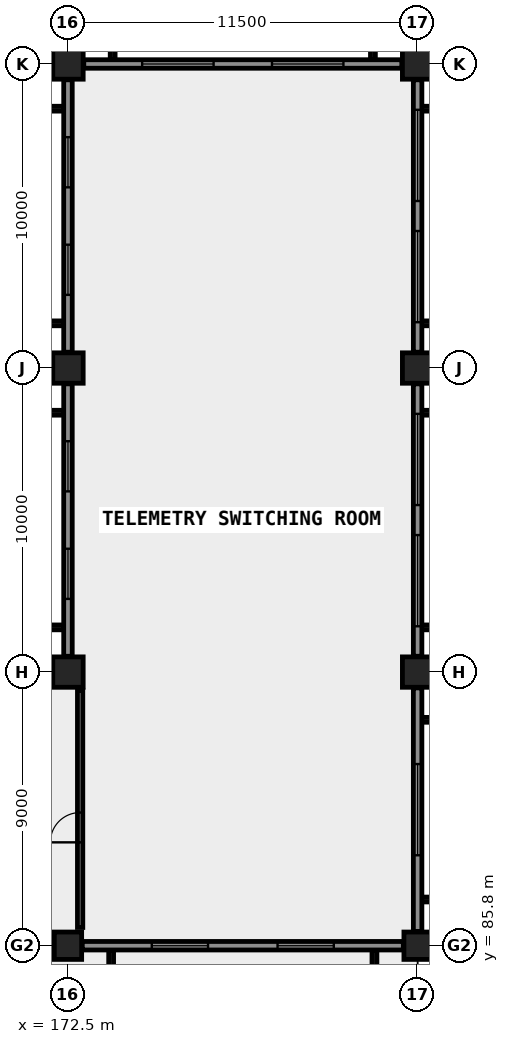
"""IFC4 building model, lengths in metres.
Left out: names, types, materials, properties, quantities, classifications, styles, units other than length and angle.
Written with IfcOpenShell. Run it as: python <this file> out.ifc"""

import sys

from ifc_helpers import new_model, si_unit, direction, frame, frame_2d, origin, origin_2d, place, context, subcontext, project, spatial, rectangle, extrude, element, fill, save


model = new_model("IFC4")
c1 = context("Model", 3, precision=1e-05, world=origin(), true_north=direction((0.0, 1.0)))
c2 = subcontext(c1, "Body", "Model", "MODEL_VIEW")
j1 = project(units=[si_unit("LENGTHUNIT", "METRE"), si_unit("PLANEANGLEUNIT", "RADIAN")], contexts=[c1])
p1 = place(None, origin())
s1 = spatial("IfcSite", under=j1, at=p1, CompositionType="ELEMENT")
p2 = place(p1, origin())
s2 = spatial("IfcBuilding", under=s1, at=p2, CompositionType="ELEMENT")
p3 = place(p2, frame((0.0, 0.0, 8.4)))
s3 = spatial("IfcBuildingStorey", under=s2, at=p3, CompositionType="ELEMENT", Elevation=8.4)
p4 = place(p3, frame((172.5, 85.8, 0.0), z_axis=(0.0, 0.0, 1.0), x_axis=(1.0, 0.0, 0.0)))
e1 = element("IfcColumn", 1, at=p4, inside=s3, PredefinedType="COLUMN", context=c2, shape_type="SweptSolid", body=[
    extrude(rectangle(XDim=0.9, YDim=0.9, at=origin_2d()), origin(), (0.0, 0.0, 1.0), 5.4),
])
for number, where, z_axis, x_axis in (
    (2, (172.5, 94.8, 0.0), (0.0, 0.0, 1.0), (1.0, 0.0, 0.0)),
    (3, (172.5, 104.8, 0.0), (0.0, 0.0, 1.0), (1.0, 0.0, 0.0)),
    (4, (172.5, 114.8, 0.0), (0.0, 0.0, 1.0), (1.0, 0.0, 0.0)),
):
    element("IfcColumn", number, at=place(p3, frame(where, z_axis=z_axis, x_axis=x_axis)), inside=s3, PredefinedType="COLUMN", context=c2, shape_type="SweptSolid", body=[
        extrude(rectangle(XDim=1.0, YDim=1.0, at=origin_2d()), origin(), (0.0, 0.0, 1.0), 5.4),
    ])
p5 = place(p3, frame((184.0, 85.8, 0.0), z_axis=(0.0, 0.0, 1.0), x_axis=(1.0, 0.0, 0.0)))
e5 = element("IfcColumn", 5, at=p5, inside=s3, PredefinedType="COLUMN", context=c2, shape_type="SweptSolid", body=[
    extrude(rectangle(XDim=0.9, YDim=0.9, at=origin_2d()), origin(), (0.0, 0.0, 1.0), 5.4),
])
for number, where, z_axis, x_axis in (
    (6, (184.0, 94.8, 0.0), (0.0, 0.0, 1.0), (1.0, 0.0, 0.0)),
    (7, (184.0, 104.8, 0.0), (0.0, 0.0, 1.0), (1.0, 0.0, 0.0)),
    (8, (184.0, 114.8, 0.0), (0.0, 0.0, 1.0), (1.0, 0.0, 0.0)),
):
    element("IfcColumn", number, at=place(p3, frame(where, z_axis=z_axis, x_axis=x_axis)), inside=s3, PredefinedType="COLUMN", context=c2, shape_type="SweptSolid", body=[
        extrude(rectangle(XDim=1.0, YDim=1.0, at=origin_2d()), origin(), (0.0, 0.0, 1.0), 5.4),
    ])
p6 = place(p3, frame((161.47, 85.8, 0.0), z_axis=(0.0, 0.0, 1.0), x_axis=(1.0, 0.0, 0.0)))
e9 = element("IfcWall", 9, at=p6, inside=s3, PredefinedType="SOLIDWALL", context=c2, shape_type="SweptSolid", body=[
    extrude(rectangle(XDim=10.56, YDim=0.28, at=frame_2d((5.28, 0.0))), origin(), (0.0, 0.0, 1.0), 4.35),
])
p7 = place(p6, frame((2.287, 0.0, 0.85)))
e10 = element("IfcOpeningElement", 10, at=p7, cuts=e9, PredefinedType="OPENING", context=c2, shape_type="SweptSolid", body=[
    extrude(rectangle(XDim=1.85, YDim=1.85, at=frame_2d((0.925, 0.925))), frame((0.0, 0.15, 0.0), z_axis=(0.0, -1.0, 0.0), x_axis=(1.0, 0.0, 0.0)), (0.0, 0.0, 1.0), 0.3),
])
p8 = place(p6, frame((6.423, 0.0, 0.85)))
e11 = element("IfcOpeningElement", 11, at=p8, cuts=e9, PredefinedType="OPENING", context=c2, shape_type="SweptSolid", body=[
    extrude(rectangle(XDim=1.85, YDim=1.85, at=frame_2d((0.925, 0.925))), frame((0.0, 0.15, 0.0), z_axis=(0.0, -1.0, 0.0), x_axis=(1.0, 0.0, 0.0)), (0.0, 0.0, 1.0), 0.3),
])
p9 = place(p3, frame((172.97, 85.8, 0.0), z_axis=(0.0, 0.0, 1.0), x_axis=(1.0, 0.0, 0.0)))
e12 = element("IfcWall", 12, at=p9, inside=s3, PredefinedType="SOLIDWALL", context=c2, shape_type="SweptSolid", body=[
    extrude(rectangle(XDim=10.56, YDim=0.28, at=frame_2d((5.28, 0.0))), origin(), (0.0, 0.0, 1.0), 4.35),
])
p10 = place(p9, frame((2.287, 0.0, 0.85)))
e13 = element("IfcOpeningElement", 13, at=p10, cuts=e12, PredefinedType="OPENING", context=c2, shape_type="SweptSolid", body=[
    extrude(rectangle(XDim=1.85, YDim=1.85, at=frame_2d((0.925, 0.925))), frame((0.0, 0.15, 0.0), z_axis=(0.0, -1.0, 0.0), x_axis=(1.0, 0.0, 0.0)), (0.0, 0.0, 1.0), 0.3),
])
p11 = place(p9, frame((6.423, 0.0, 0.85)))
e14 = element("IfcOpeningElement", 14, at=p11, cuts=e12, PredefinedType="OPENING", context=c2, shape_type="SweptSolid", body=[
    extrude(rectangle(XDim=1.85, YDim=1.85, at=frame_2d((0.925, 0.925))), frame((0.0, 0.15, 0.0), z_axis=(0.0, -1.0, 0.0), x_axis=(1.0, 0.0, 0.0)), (0.0, 0.0, 1.0), 0.3),
])
p12 = place(p3, frame((184.0, 86.27, 0.0), z_axis=(0.0, 0.0, 1.0), x_axis=(0.0, 1.0, 0.0)))
e15 = element("IfcWall", 15, at=p12, inside=s3, PredefinedType="SOLIDWALL", context=c2, shape_type="SweptSolid", body=[
    extrude(rectangle(XDim=8.01, YDim=0.28, at=frame_2d((4.005, 0.0))), origin(), (0.0, 0.0, 1.0), 4.45),
])
p13 = place(p12, frame((2.505, 0.0, 0.85)))
e16 = element("IfcOpeningElement", 16, at=p13, cuts=e15, PredefinedType="OPENING", context=c2, shape_type="SweptSolid", body=[
    extrude(rectangle(XDim=3.0, YDim=2.0, at=frame_2d((1.5, 1.0))), frame((0.0, 0.15, 0.0), z_axis=(0.0, -1.0, 0.0), x_axis=(1.0, 0.0, 0.0)), (0.0, 0.0, 1.0), 0.3),
])
p14 = place(p3, frame((184.0, 95.32, 0.0), z_axis=(0.0, 0.0, 1.0), x_axis=(0.0, 1.0, 0.0)))
e17 = element("IfcWall", 17, at=p14, inside=s3, PredefinedType="SOLIDWALL", context=c2, shape_type="SweptSolid", body=[
    extrude(rectangle(XDim=8.96, YDim=0.28, at=frame_2d((4.48, 0.0))), origin(), (0.0, 0.0, 1.0), 4.45),
])
p15 = place(p14, frame((0.987, 0.0, 0.85)))
e18 = element("IfcOpeningElement", 18, at=p15, cuts=e17, PredefinedType="OPENING", context=c2, shape_type="SweptSolid", body=[
    extrude(rectangle(XDim=3.0, YDim=2.0, at=frame_2d((1.5, 1.0))), frame((0.0, 0.15, 0.0), z_axis=(0.0, -1.0, 0.0), x_axis=(1.0, 0.0, 0.0)), (0.0, 0.0, 1.0), 0.3),
])
p16 = place(p14, frame((4.973, 0.0, 0.85)))
e19 = element("IfcOpeningElement", 19, at=p16, cuts=e17, PredefinedType="OPENING", context=c2, shape_type="SweptSolid", body=[
    extrude(rectangle(XDim=3.0, YDim=2.0, at=frame_2d((1.5, 1.0))), frame((0.0, 0.15, 0.0), z_axis=(0.0, -1.0, 0.0), x_axis=(1.0, 0.0, 0.0)), (0.0, 0.0, 1.0), 0.3),
])
p17 = place(p3, frame((184.0, 105.32, 0.0), z_axis=(0.0, 0.0, 1.0), x_axis=(0.0, 1.0, 0.0)))
e20 = element("IfcWall", 20, at=p17, inside=s3, PredefinedType="SOLIDWALL", context=c2, shape_type="SweptSolid", body=[
    extrude(rectangle(XDim=8.96, YDim=0.28, at=frame_2d((4.48, 0.0))), origin(), (0.0, 0.0, 1.0), 4.45),
])
p18 = place(p17, frame((0.987, 0.0, 0.85)))
e21 = element("IfcOpeningElement", 21, at=p18, cuts=e20, PredefinedType="OPENING", context=c2, shape_type="SweptSolid", body=[
    extrude(rectangle(XDim=3.0, YDim=2.0, at=frame_2d((1.5, 1.0))), frame((0.0, 0.15, 0.0), z_axis=(0.0, -1.0, 0.0), x_axis=(1.0, 0.0, 0.0)), (0.0, 0.0, 1.0), 0.3),
])
p19 = place(p17, frame((4.973, 0.0, 0.85)))
e22 = element("IfcOpeningElement", 22, at=p19, cuts=e20, PredefinedType="OPENING", context=c2, shape_type="SweptSolid", body=[
    extrude(rectangle(XDim=3.0, YDim=2.0, at=frame_2d((1.5, 1.0))), frame((0.0, 0.15, 0.0), z_axis=(0.0, -1.0, 0.0), x_axis=(1.0, 0.0, 0.0)), (0.0, 0.0, 1.0), 0.3),
])
p20 = place(p3, frame((173.02, 114.8, 0.0), z_axis=(0.0, 0.0, 1.0), x_axis=(1.0, 0.0, 0.0)))
e23 = element("IfcWall", 23, at=p20, inside=s3, PredefinedType="SOLIDWALL", context=c2, shape_type="SweptSolid", body=[
    extrude(rectangle(XDim=10.46, YDim=0.28, at=frame_2d((5.23, 0.0))), origin(), (0.0, 0.0, 1.0), 4.35),
])
p21 = place(p20, frame((1.92, 0.0, 0.85)))
e24 = element("IfcOpeningElement", 24, at=p21, cuts=e23, PredefinedType="OPENING", context=c2, shape_type="SweptSolid", body=[
    extrude(rectangle(XDim=2.35, YDim=2.05, at=frame_2d((1.175, 1.025))), frame((0.0, 0.15, 0.0), z_axis=(0.0, -1.0, 0.0), x_axis=(1.0, 0.0, 0.0)), (0.0, 0.0, 1.0), 0.3),
])
p22 = place(p20, frame((6.19, 0.0, 0.85)))
e25 = element("IfcOpeningElement", 25, at=p22, cuts=e23, PredefinedType="OPENING", context=c2, shape_type="SweptSolid", body=[
    extrude(rectangle(XDim=2.35, YDim=2.05, at=frame_2d((1.175, 1.025))), frame((0.0, 0.15, 0.0), z_axis=(0.0, -1.0, 0.0), x_axis=(1.0, 0.0, 0.0)), (0.0, 0.0, 1.0), 0.3),
])
p23 = place(p3, frame((172.5, 95.32, 0.0), z_axis=(0.0, 0.0, 1.0), x_axis=(0.0, 1.0, 0.0)))
e26 = element("IfcWall", 26, at=p23, inside=s3, PredefinedType="SOLIDWALL", context=c2, shape_type="SweptSolid", body=[
    extrude(rectangle(XDim=8.96, YDim=0.28, at=frame_2d((4.48, 0.0))), origin(), (0.0, 0.0, 1.0), 4.35),
])
p24 = place(p23, frame((1.887, 0.0, 0.85)))
e27 = element("IfcOpeningElement", 27, at=p24, cuts=e26, PredefinedType="OPENING", context=c2, shape_type="SweptSolid", body=[
    extrude(rectangle(XDim=1.65, YDim=1.9, at=frame_2d((0.825, 0.95))), frame((0.0, 0.15, 0.0), z_axis=(0.0, -1.0, 0.0), x_axis=(1.0, 0.0, 0.0)), (0.0, 0.0, 1.0), 0.3),
])
p25 = place(p23, frame((5.423, 0.0, 0.85)))
e28 = element("IfcOpeningElement", 28, at=p25, cuts=e26, PredefinedType="OPENING", context=c2, shape_type="SweptSolid", body=[
    extrude(rectangle(XDim=1.65, YDim=1.9, at=frame_2d((0.825, 0.95))), frame((0.0, 0.15, 0.0), z_axis=(0.0, -1.0, 0.0), x_axis=(1.0, 0.0, 0.0)), (0.0, 0.0, 1.0), 0.3),
])
p26 = place(p3, frame((172.5, 105.32, 0.0), z_axis=(0.0, 0.0, 1.0), x_axis=(0.0, 1.0, 0.0)))
e29 = element("IfcWall", 29, at=p26, inside=s3, PredefinedType="SOLIDWALL", context=c2, shape_type="SweptSolid", body=[
    extrude(rectangle(XDim=8.96, YDim=0.28, at=frame_2d((4.48, 0.0))), origin(), (0.0, 0.0, 1.0), 4.35),
])
p27 = place(p26, frame((1.887, 0.0, 0.85)))
e30 = element("IfcOpeningElement", 30, at=p27, cuts=e29, PredefinedType="OPENING", context=c2, shape_type="SweptSolid", body=[
    extrude(rectangle(XDim=1.65, YDim=1.9, at=frame_2d((0.825, 0.95))), frame((0.0, 0.15, 0.0), z_axis=(0.0, -1.0, 0.0), x_axis=(1.0, 0.0, 0.0)), (0.0, 0.0, 1.0), 0.3),
])
p28 = place(p26, frame((5.423, 0.0, 0.85)))
e31 = element("IfcOpeningElement", 31, at=p28, cuts=e29, PredefinedType="OPENING", context=c2, shape_type="SweptSolid", body=[
    extrude(rectangle(XDim=1.65, YDim=1.9, at=frame_2d((0.825, 0.95))), frame((0.0, 0.15, 0.0), z_axis=(0.0, -1.0, 0.0), x_axis=(1.0, 0.0, 0.0)), (0.0, 0.0, 1.0), 0.3),
])
p29 = place(p3, frame((172.9, 86.4, 0.0), z_axis=(0.0, 0.0, 1.0), x_axis=(0.0, 1.0, 0.0)))
e32 = element("IfcWall", 32, at=p29, inside=s3, PredefinedType="PARTITIONING", context=c2, shape_type="SweptSolid", body=[
    extrude(rectangle(XDim=7.8, YDim=0.175, at=frame_2d((3.9, 0.0))), origin(), (0.0, 0.0, 1.0), 5.12),
])
p30 = place(p29, frame((2.8, 0.0, 0.0)))
e33 = element("IfcOpeningElement", 33, at=p30, cuts=e32, PredefinedType="OPENING", context=c2, shape_type="SweptSolid", body=[
    extrude(rectangle(XDim=0.98, YDim=2.15, at=frame_2d((0.49, 1.075))), frame((0.0, 0.098, 0.0), z_axis=(0.0, -1.0, 0.0), x_axis=(1.0, 0.0, 0.0)), (0.0, 0.0, 1.0), 0.195),
])
p31 = place(p10, origin())
e34 = element("IfcWindow", 34, at=p31, inside=s3, PartitioningType="SINGLE_PANEL", PredefinedType="WINDOW", context=c2, shape_type="SweptSolid", body=[
    extrude(rectangle(XDim=1.85, YDim=1.85, at=frame_2d((0.925, 0.925))), frame((0.0, 0.03, 0.0), z_axis=(0.0, -1.0, 0.0), x_axis=(1.0, 0.0, 0.0)), (0.0, 0.0, 1.0), 0.06),
])
fill(e13, e34)
p32 = place(p11, origin())
e35 = element("IfcWindow", 35, at=p32, inside=s3, PartitioningType="SINGLE_PANEL", PredefinedType="WINDOW", context=c2, shape_type="SweptSolid", body=[
    extrude(rectangle(XDim=1.85, YDim=1.85, at=frame_2d((0.925, 0.925))), frame((0.0, 0.03, 0.0), z_axis=(0.0, -1.0, 0.0), x_axis=(1.0, 0.0, 0.0)), (0.0, 0.0, 1.0), 0.06),
])
fill(e14, e35)
p33 = place(p13, origin())
e36 = element("IfcWindow", 36, at=p33, inside=s3, PartitioningType="SINGLE_PANEL", PredefinedType="WINDOW", context=c2, shape_type="SweptSolid", body=[
    extrude(rectangle(XDim=3.0, YDim=2.0, at=frame_2d((1.5, 1.0))), frame((0.0, 0.03, 0.0), z_axis=(0.0, -1.0, 0.0), x_axis=(1.0, 0.0, 0.0)), (0.0, 0.0, 1.0), 0.06),
])
fill(e16, e36)
p34 = place(p15, origin())
e37 = element("IfcWindow", 37, at=p34, inside=s3, PartitioningType="SINGLE_PANEL", PredefinedType="WINDOW", context=c2, shape_type="SweptSolid", body=[
    extrude(rectangle(XDim=3.0, YDim=2.0, at=frame_2d((1.5, 1.0))), frame((0.0, 0.03, 0.0), z_axis=(0.0, -1.0, 0.0), x_axis=(1.0, 0.0, 0.0)), (0.0, 0.0, 1.0), 0.06),
])
fill(e18, e37)
p35 = place(p16, origin())
e38 = element("IfcWindow", 38, at=p35, inside=s3, PartitioningType="SINGLE_PANEL", PredefinedType="WINDOW", context=c2, shape_type="SweptSolid", body=[
    extrude(rectangle(XDim=3.0, YDim=2.0, at=frame_2d((1.5, 1.0))), frame((0.0, 0.03, 0.0), z_axis=(0.0, -1.0, 0.0), x_axis=(1.0, 0.0, 0.0)), (0.0, 0.0, 1.0), 0.06),
])
fill(e19, e38)
p36 = place(p18, origin())
e39 = element("IfcWindow", 39, at=p36, inside=s3, PartitioningType="SINGLE_PANEL", PredefinedType="WINDOW", context=c2, shape_type="SweptSolid", body=[
    extrude(rectangle(XDim=3.0, YDim=2.0, at=frame_2d((1.5, 1.0))), frame((0.0, 0.03, 0.0), z_axis=(0.0, -1.0, 0.0), x_axis=(1.0, 0.0, 0.0)), (0.0, 0.0, 1.0), 0.06),
])
fill(e21, e39)
p37 = place(p19, origin())
e40 = element("IfcWindow", 40, at=p37, inside=s3, PartitioningType="SINGLE_PANEL", PredefinedType="WINDOW", context=c2, shape_type="SweptSolid", body=[
    extrude(rectangle(XDim=3.0, YDim=2.0, at=frame_2d((1.5, 1.0))), frame((0.0, 0.03, 0.0), z_axis=(0.0, -1.0, 0.0), x_axis=(1.0, 0.0, 0.0)), (0.0, 0.0, 1.0), 0.06),
])
fill(e22, e40)
p38 = place(p21, origin())
e41 = element("IfcWindow", 41, at=p38, inside=s3, PartitioningType="SINGLE_PANEL", PredefinedType="WINDOW", context=c2, shape_type="SweptSolid", body=[
    extrude(rectangle(XDim=2.35, YDim=2.05, at=frame_2d((1.175, 1.025))), frame((0.0, 0.03, 0.0), z_axis=(0.0, -1.0, 0.0), x_axis=(1.0, 0.0, 0.0)), (0.0, 0.0, 1.0), 0.06),
])
fill(e24, e41)
p39 = place(p22, origin())
e42 = element("IfcWindow", 42, at=p39, inside=s3, PartitioningType="SINGLE_PANEL", PredefinedType="WINDOW", context=c2, shape_type="SweptSolid", body=[
    extrude(rectangle(XDim=2.35, YDim=2.05, at=frame_2d((1.175, 1.025))), frame((0.0, 0.03, 0.0), z_axis=(0.0, -1.0, 0.0), x_axis=(1.0, 0.0, 0.0)), (0.0, 0.0, 1.0), 0.06),
])
fill(e25, e42)
p40 = place(p24, origin())
e43 = element("IfcWindow", 43, at=p40, inside=s3, PartitioningType="SINGLE_PANEL", PredefinedType="WINDOW", context=c2, shape_type="SweptSolid", body=[
    extrude(rectangle(XDim=1.65, YDim=1.9, at=frame_2d((0.825, 0.95))), frame((0.0, 0.03, 0.0), z_axis=(0.0, -1.0, 0.0), x_axis=(1.0, 0.0, 0.0)), (0.0, 0.0, 1.0), 0.06),
])
fill(e27, e43)
p41 = place(p25, origin())
e44 = element("IfcWindow", 44, at=p41, inside=s3, PartitioningType="SINGLE_PANEL", PredefinedType="WINDOW", context=c2, shape_type="SweptSolid", body=[
    extrude(rectangle(XDim=1.65, YDim=1.9, at=frame_2d((0.825, 0.95))), frame((0.0, 0.03, 0.0), z_axis=(0.0, -1.0, 0.0), x_axis=(1.0, 0.0, 0.0)), (0.0, 0.0, 1.0), 0.06),
])
fill(e28, e44)
p42 = place(p27, origin())
e45 = element("IfcWindow", 45, at=p42, inside=s3, PartitioningType="SINGLE_PANEL", PredefinedType="WINDOW", context=c2, shape_type="SweptSolid", body=[
    extrude(rectangle(XDim=1.65, YDim=1.9, at=frame_2d((0.825, 0.95))), frame((0.0, 0.03, 0.0), z_axis=(0.0, -1.0, 0.0), x_axis=(1.0, 0.0, 0.0)), (0.0, 0.0, 1.0), 0.06),
])
fill(e30, e45)
p43 = place(p28, origin())
e46 = element("IfcWindow", 46, at=p43, inside=s3, PartitioningType="SINGLE_PANEL", PredefinedType="WINDOW", context=c2, shape_type="SweptSolid", body=[
    extrude(rectangle(XDim=1.65, YDim=1.9, at=frame_2d((0.825, 0.95))), frame((0.0, 0.03, 0.0), z_axis=(0.0, -1.0, 0.0), x_axis=(1.0, 0.0, 0.0)), (0.0, 0.0, 1.0), 0.06),
])
fill(e31, e46)
p44 = place(p30, origin())
e47 = element("IfcDoor", 47, at=p44, inside=s3, OperationType="SINGLE_SWING_LEFT", PredefinedType="DOOR", context=c2, shape_type="SweptSolid", body=[
    extrude(rectangle(XDim=0.98, YDim=2.15, at=frame_2d((0.49, 1.075))), frame((0.0, 0.025, 0.0), z_axis=(0.0, -1.0, 0.0), x_axis=(1.0, 0.0, 0.0)), (0.0, 0.0, 1.0), 0.05),
])
fill(e33, e47)
save(model, sys.argv[1])
